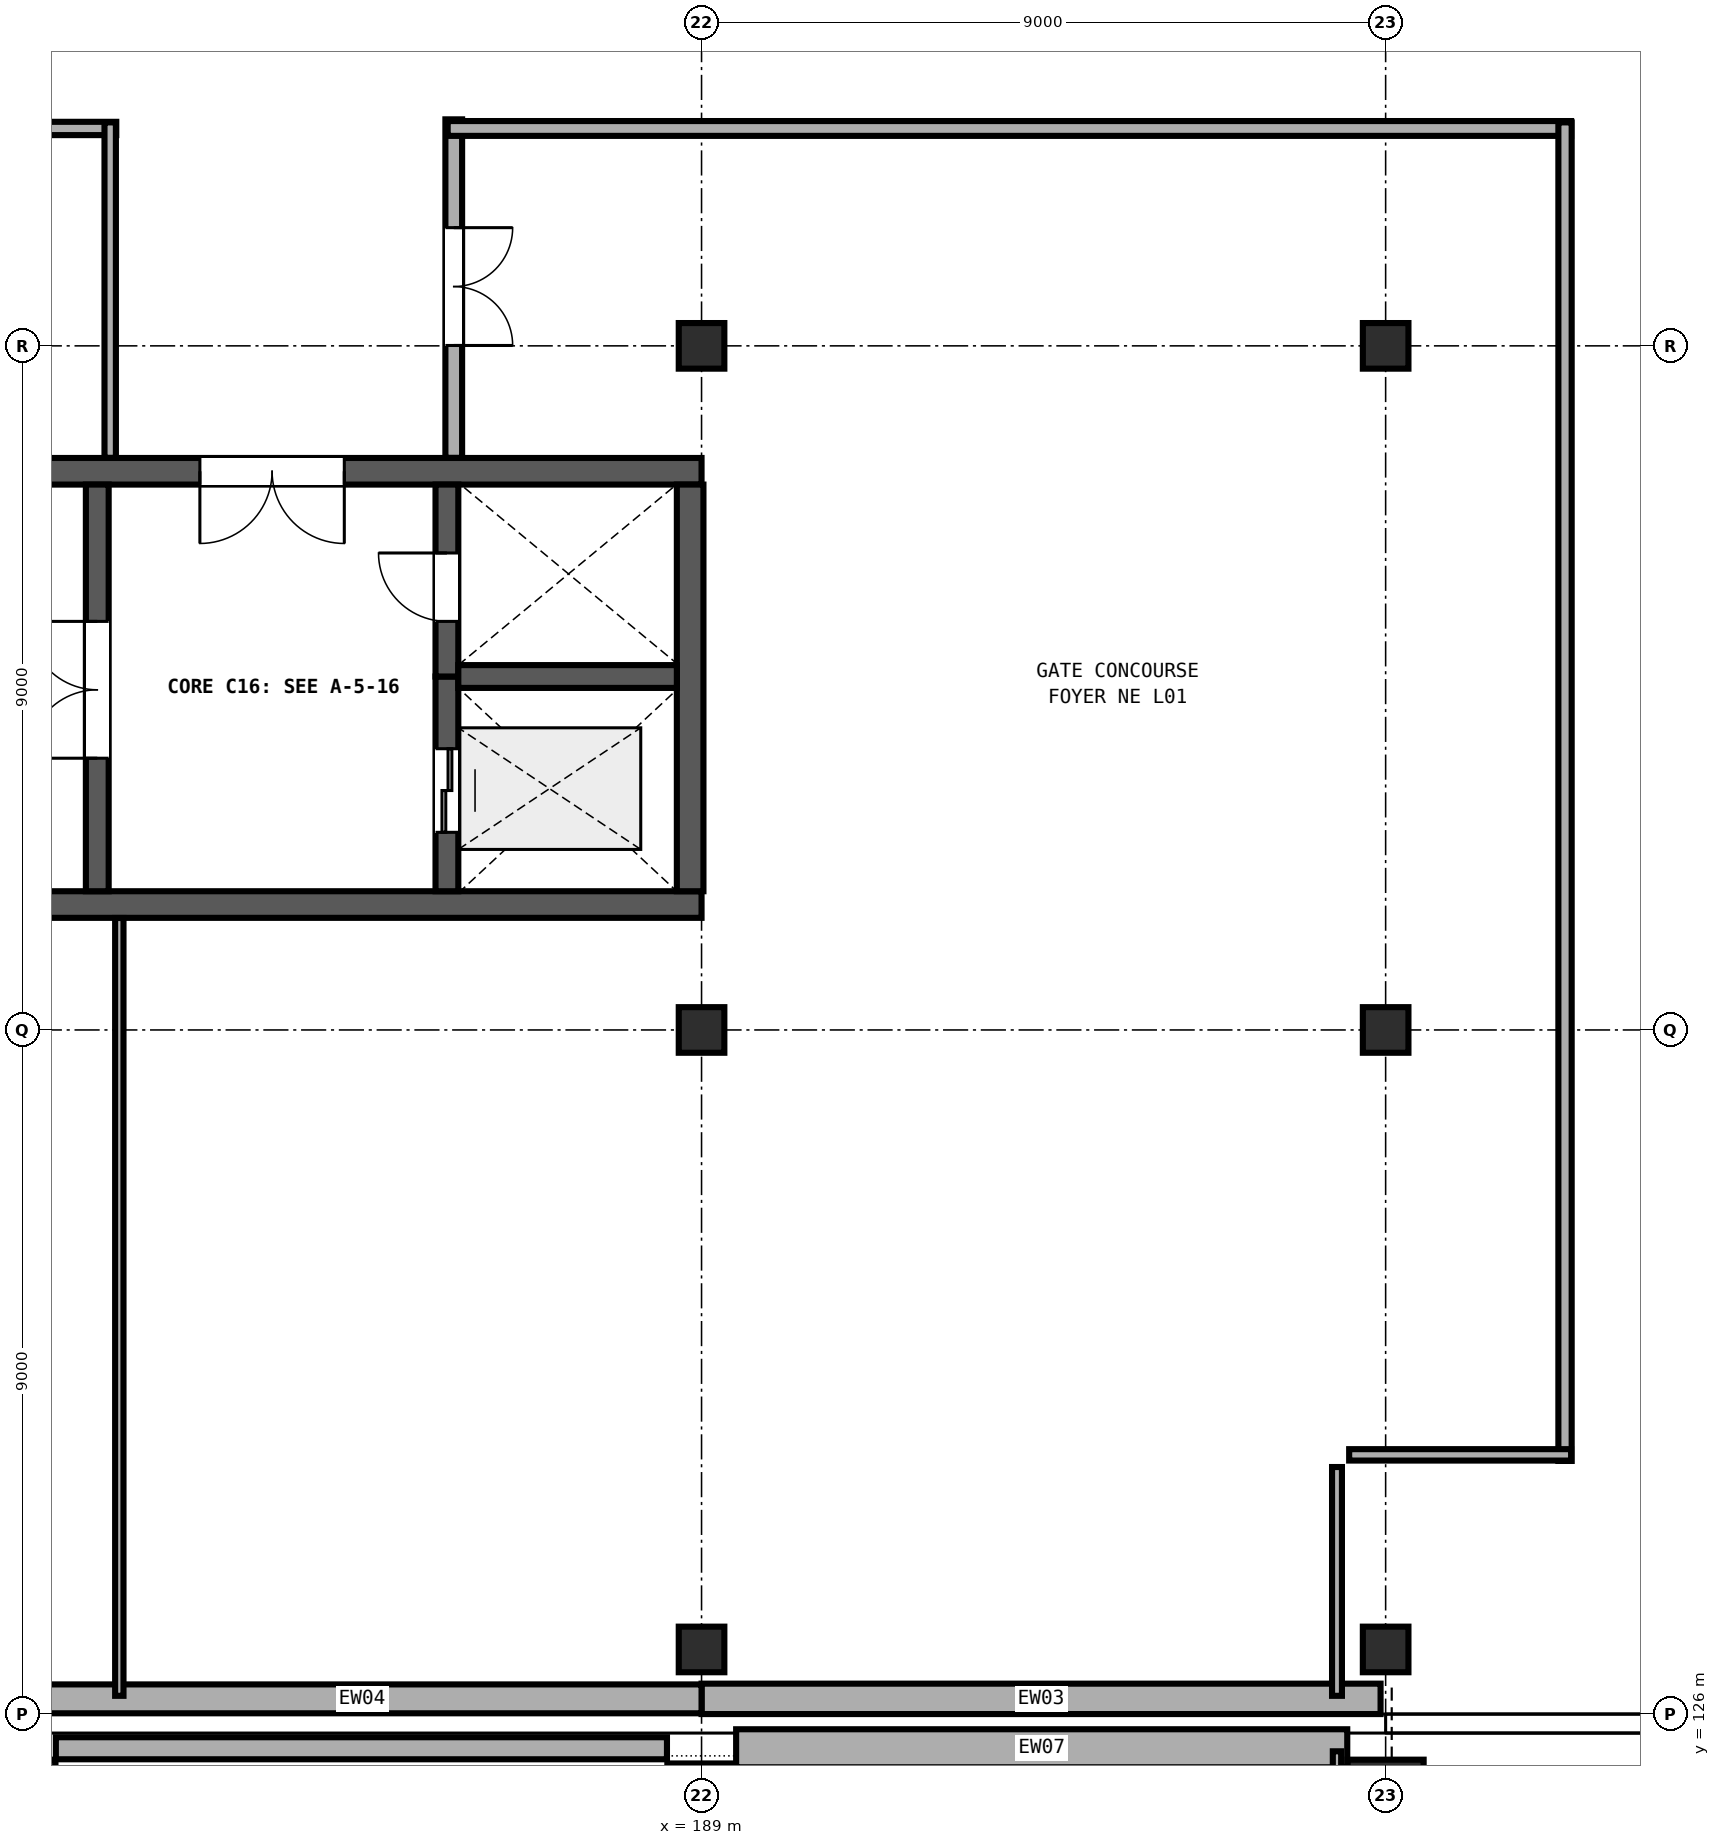
"""IFC4 building model, lengths in metres.
Left out: names, types, materials, properties, quantities, classifications, styles, units other than length and angle.
Written with IfcOpenShell. Run it as: python <this file> out.ifc"""

import sys

from ifc_helpers import new_model, si_unit, direction, frame, frame_2d, origin, origin_2d, place, context, subcontext, project, spatial, rectangle, extrude, element, fill, save


model = new_model("IFC4")
c1 = context("Model", 3, precision=1e-05, world=origin(), true_north=direction((0.0, 1.0)))
c2 = subcontext(c1, "Body", "Model", "MODEL_VIEW")
j1 = project(units=[si_unit("LENGTHUNIT", "METRE"), si_unit("PLANEANGLEUNIT", "RADIAN")], contexts=[c1])
p1 = place(None, origin())
s1 = spatial("IfcSite", under=j1, at=p1, CompositionType="ELEMENT")
p2 = place(p1, origin())
s2 = spatial("IfcBuilding", under=s1, at=p2, CompositionType="ELEMENT")
p3 = place(p2, frame((0.0, 0.0, 4.8)))
s3 = spatial("IfcBuildingStorey", under=s2, at=p3, CompositionType="ELEMENT", Elevation=4.8)
p4 = place(p3, frame((180.0, 124.9, 0.0), z_axis=(0.0, 0.0, 1.0), x_axis=(1.0, 0.0, 0.0)))
e1 = element("IfcColumn", 1, at=p4, inside=s3, PredefinedType="COLUMN", context=c2, shape_type="SweptSolid", body=[
    extrude(rectangle(XDim=1.0, YDim=1.0, at=origin_2d()), origin(), (0.0, 0.0, 1.0), 4.8),
])
p5 = place(p3, frame((189.0, 124.9, 0.0), z_axis=(0.0, 0.0, 1.0), x_axis=(1.0, 0.0, 0.0)))
e2 = element("IfcColumn", 2, at=p5, inside=s3, PredefinedType="COLUMN", context=c2, shape_type="SweptSolid", body=[
    extrude(rectangle(XDim=0.9, YDim=0.9, at=origin_2d()), origin(), (0.0, 0.0, 1.0), 4.8),
])
p6 = place(p3, frame((198.0, 124.9, 0.0), z_axis=(0.0, 0.0, 1.0), x_axis=(1.0, 0.0, 0.0)))
e3 = element("IfcColumn", 3, at=p6, inside=s3, PredefinedType="COLUMN", context=c2, shape_type="SweptSolid", body=[
    extrude(rectangle(XDim=1.0, YDim=1.0, at=origin_2d()), origin(), (0.0, 0.0, 1.0), 4.8),
])
for number, where, z_axis, x_axis in (
    (4, (189.0, 126.85, 0.0), (0.0, 0.0, 1.0), (1.0, 0.0, 0.0)),
    (5, (189.0, 135.0, 0.0), (0.0, 0.0, 1.0), (1.0, 0.0, 0.0)),
    (6, (189.0, 144.0, 0.0), (0.0, 0.0, 1.0), (1.0, 0.0, 0.0)),
    (7, (198.0, 126.85, 0.0), (0.0, 0.0, 1.0), (1.0, 0.0, 0.0)),
    (8, (198.0, 135.0, 0.0), (0.0, 0.0, 1.0), (1.0, 0.0, 0.0)),
    (9, (198.0, 144.0, 0.0), (0.0, 0.0, 1.0), (1.0, 0.0, 0.0)),
):
    element("IfcColumn", number, at=place(p3, frame(where, z_axis=z_axis, x_axis=x_axis)), inside=s3, PredefinedType="COLUMN", context=c2, shape_type="SweptSolid", body=[
        extrude(rectangle(XDim=0.6, YDim=0.6, at=origin_2d()), origin(), (0.0, 0.0, 1.0), 4.8),
    ])
p7 = place(p3, frame((171.0, 136.65, 0.0), z_axis=(0.0, 0.0, 1.0), x_axis=(1.0, 0.0, 0.0)))
e10 = element("IfcWall", 10, at=p7, inside=s3, PredefinedType="SHEAR", context=c2, shape_type="SweptSolid", body=[
    extrude(rectangle(XDim=18.0, YDim=0.35, at=frame_2d((9.0, 0.0))), origin(), (0.0, 0.0, 1.0), 4.565),
])
p8 = place(p3, frame((189.0, 142.35, 0.0), z_axis=(0.0, 0.0, 1.0), x_axis=(-1.0, 0.0, 0.0)))
e11 = element("IfcWall", 11, at=p8, inside=s3, PredefinedType="SHEAR", context=c2, shape_type="SweptSolid", body=[
    extrude(rectangle(XDim=18.0, YDim=0.35, at=frame_2d((9.0, 0.0))), origin(), (0.0, 0.0, 1.0), 4.565),
])
p9 = place(p8, frame((4.7, 0.0, 0.0)))
e12 = element("IfcOpeningElement", 12, at=p9, cuts=e11, PredefinedType="OPENING", context=c2, shape_type="SweptSolid", body=[
    extrude(rectangle(XDim=1.9, YDim=2.25, at=frame_2d((0.95, 1.125))), frame((0.0, 0.185, 0.0), z_axis=(0.0, -1.0, 0.0), x_axis=(1.0, 0.0, 0.0)), (0.0, 0.0, 1.0), 0.37),
])
p10 = place(p3, frame((188.85, 136.825, 0.0), z_axis=(0.0, 0.0, 1.0), x_axis=(0.0, 1.0, 0.0)))
e13 = element("IfcWall", 13, at=p10, inside=s3, PredefinedType="SHEAR", context=c2, shape_type="SweptSolid", body=[
    extrude(rectangle(XDim=5.35, YDim=0.35, at=frame_2d((2.675, 0.0))), origin(), (0.0, 0.0, 1.0), 4.565),
])
p11 = place(p3, frame((181.05, 136.825, 0.0), z_axis=(0.0, 0.0, 1.0), x_axis=(0.0, 1.0, 0.0)))
e14 = element("IfcWall", 14, at=p11, inside=s3, PredefinedType="SHEAR", context=c2, shape_type="SweptSolid", body=[
    extrude(rectangle(XDim=5.35, YDim=0.3, at=frame_2d((2.675, 0.0))), origin(), (0.0, 0.0, 1.0), 4.565),
])
p12 = place(p11, frame((1.75, 0.0, 0.0)))
e15 = element("IfcOpeningElement", 15, at=p12, cuts=e14, PredefinedType="OPENING", context=c2, shape_type="SweptSolid", body=[
    extrude(rectangle(XDim=1.8, YDim=2.25, at=frame_2d((0.9, 1.125))), frame((0.0, 0.16, 0.0), z_axis=(0.0, -1.0, 0.0), x_axis=(1.0, 0.0, 0.0)), (0.0, 0.0, 1.0), 0.32),
])
p13 = place(p3, frame((185.65, 136.825, 0.0), z_axis=(0.0, 0.0, 1.0), x_axis=(0.0, 1.0, 0.0)))
e16 = element("IfcWall", 16, at=p13, inside=s3, PredefinedType="SHEAR", context=c2, shape_type="SweptSolid", body=[
    extrude(rectangle(XDim=2.825, YDim=0.3, at=frame_2d((1.413, 0.0))), origin(), (0.0, 0.0, 1.0), 4.565),
])
p14 = place(p13, frame((0.775, 0.0, 0.0)))
e17 = element("IfcOpeningElement", 17, at=p14, cuts=e16, PredefinedType="OPENING", context=c2, shape_type="SweptSolid", body=[
    extrude(rectangle(XDim=1.1, YDim=2.1, at=frame_2d((0.55, 1.05))), frame((0.0, 0.16, 0.0), z_axis=(0.0, -1.0, 0.0), x_axis=(1.0, 0.0, 0.0)), (0.0, 0.0, 1.0), 0.32),
])
p15 = place(p3, frame((185.65, 139.65, 0.0), z_axis=(0.0, 0.0, 1.0), x_axis=(0.0, 1.0, 0.0)))
e18 = element("IfcWall", 18, at=p15, inside=s3, PredefinedType="SHEAR", context=c2, shape_type="SweptSolid", body=[
    extrude(rectangle(XDim=2.525, YDim=0.3, at=frame_2d((1.263, 0.0))), origin(), (0.0, 0.0, 1.0), 4.565),
])
p16 = place(p15, frame((0.725, 0.0, 0.0)))
e19 = element("IfcOpeningElement", 19, at=p16, cuts=e18, PredefinedType="OPENING", context=c2, shape_type="SweptSolid", body=[
    extrude(rectangle(XDim=0.9, YDim=2.1, at=frame_2d((0.45, 1.05))), frame((0.0, 0.16, 0.0), z_axis=(0.0, -1.0, 0.0), x_axis=(1.0, 0.0, 0.0)), (0.0, 0.0, 1.0), 0.32),
])
p17 = place(p3, frame((185.8, 139.65, 0.0), z_axis=(0.0, 0.0, 1.0), x_axis=(1.0, 0.0, 0.0)))
e20 = element("IfcWall", 20, at=p17, inside=s3, PredefinedType="SHEAR", context=c2, shape_type="SweptSolid", body=[
    extrude(rectangle(XDim=2.875, YDim=0.3, at=frame_2d((1.438, 0.0))), origin(), (0.0, 0.0, 1.0), 4.565),
])
p18 = place(p3, frame((180.505, 125.55, 0.0), z_axis=(0.0, 0.0, 1.0), x_axis=(1.0, 0.0, 0.0)))
e21 = element("IfcWall", 21, at=p18, inside=s3, PredefinedType="SOLIDWALL", context=c2, shape_type="SweptSolid", body=[
    extrude(rectangle(XDim=8.04, YDim=0.29, at=frame_2d((4.02, 0.0))), origin(), (0.0, 0.0, 1.0), 3.28),
])
p19 = place(p3, frame((189.455, 125.55, 0.0), z_axis=(0.0, 0.0, 1.0), x_axis=(1.0, 0.0, 0.0)))
e22 = element("IfcWall", 22, at=p19, inside=s3, PredefinedType="SOLIDWALL", context=c2, shape_type="SweptSolid", body=[
    extrude(rectangle(XDim=8.04, YDim=0.5, at=frame_2d((4.02, 0.0))), origin(), (0.0, 0.0, 1.0), 3.28),
])
p20 = place(p3, frame((197.933, 126.2, 0.0), z_axis=(0.0, 0.0, 1.0), x_axis=(-1.0, 0.0, 0.0)))
e23 = element("IfcWall", 23, at=p20, inside=s3, PredefinedType="SOLIDWALL", context=c2, shape_type="SweptSolid", body=[
    extrude(rectangle(XDim=8.933, YDim=0.4, at=frame_2d((4.467, 0.0))), origin(), (0.0, 0.0, 1.0), 3.28),
])
p21 = place(p3, frame((189.0, 126.2, 0.0), z_axis=(0.0, 0.0, 1.0), x_axis=(-1.0, 0.0, 0.0)))
e24 = element("IfcWall", 24, at=p21, inside=s3, PredefinedType="SOLIDWALL", context=c2, shape_type="SweptSolid", body=[
    extrude(rectangle(XDim=8.933, YDim=0.38, at=frame_2d((4.467, 0.0))), origin(), (0.0, 0.0, 1.0), 3.28),
])
p22 = place(p3, frame((197.36, 125.51, 0.0), z_axis=(0.0, 0.0, 1.0), x_axis=(0.0, -1.0, 0.0)))
e25 = element("IfcWall", 25, at=p22, inside=s3, PredefinedType="PARTITIONING", context=c2, shape_type="SweptSolid", body=[
    extrude(rectangle(XDim=3.01, YDim=0.11, at=frame_2d((1.505, 0.0))), origin(), (0.0, 0.0, 1.0), 3.28),
])
p23 = place(p3, frame((185.74, 146.98, 0.0), z_axis=(0.0, 0.0, 1.0), x_axis=(0.0, -1.0, 0.0)))
e26 = element("IfcWall", 26, at=p23, inside=s3, PredefinedType="PARTITIONING", context=c2, shape_type="SweptSolid", body=[
    extrude(rectangle(XDim=4.453, YDim=0.22, at=frame_2d((2.227, 0.0))), origin(), (0.0, 0.0, 1.0), 3.28),
])
p24 = place(p23, frame((1.425, 0.0, 0.0)))
e27 = element("IfcOpeningElement", 27, at=p24, cuts=e26, PredefinedType="OPENING", context=c2, shape_type="SweptSolid", body=[
    extrude(rectangle(XDim=1.55, YDim=2.2, at=frame_2d((0.775, 1.1))), frame((0.0, 0.12, 0.0), z_axis=(0.0, -1.0, 0.0), x_axis=(1.0, 0.0, 0.0)), (0.0, 0.0, 1.0), 0.24),
])
p25 = place(p3, frame((185.66, 146.86, 0.0), z_axis=(0.0, 0.0, 1.0), x_axis=(1.0, 0.0, 0.0)))
e28 = element("IfcWall", 28, at=p25, inside=s3, PredefinedType="PARTITIONING", context=c2, shape_type="SweptSolid", body=[
    extrude(rectangle(XDim=14.78, YDim=0.195, at=frame_2d((7.39, 0.0))), origin(), (0.0, 0.0, 1.0), 3.28),
])
p26 = place(p3, frame((200.36, 146.94, 0.0), z_axis=(0.0, 0.0, 1.0), x_axis=(0.0, -1.0, 0.0)))
e29 = element("IfcWall", 29, at=p26, inside=s3, PredefinedType="PARTITIONING", context=c2, shape_type="SweptSolid", body=[
    extrude(rectangle(XDim=17.61, YDim=0.175, at=frame_2d((8.805, 0.0))), origin(), (0.0, 0.0, 1.0), 3.28),
])
p27 = place(p3, frame((200.44, 129.41, 0.0), z_axis=(0.0, 0.0, 1.0), x_axis=(-1.0, 0.0, 0.0)))
e30 = element("IfcWall", 30, at=p27, inside=s3, PredefinedType="PARTITIONING", context=c2, shape_type="SweptSolid", body=[
    extrude(rectangle(XDim=2.92, YDim=0.15, at=frame_2d((1.46, 0.0))), origin(), (0.0, 0.0, 1.0), 3.28),
])
p28 = place(p3, frame((197.36, 129.25, 0.0), z_axis=(0.0, 0.0, 1.0), x_axis=(0.0, -1.0, 0.0)))
e31 = element("IfcWall", 31, at=p28, inside=s3, PredefinedType="PARTITIONING", context=c2, shape_type="SweptSolid", body=[
    extrude(rectangle(XDim=3.01, YDim=0.13, at=frame_2d((1.505, 0.0))), origin(), (0.0, 0.0, 1.0), 3.28),
])
p29 = place(p3, frame((181.34, 126.24, 0.0), z_axis=(0.0, 0.0, 1.0), x_axis=(0.0, 1.0, 0.0)))
e32 = element("IfcWall", 32, at=p29, inside=s3, PredefinedType="PARTITIONING", context=c2, shape_type="SweptSolid", body=[
    extrude(rectangle(XDim=10.233, YDim=0.11, at=frame_2d((5.116, 0.0))), origin(), (0.0, 0.0, 1.0), 3.28),
])
p30 = place(p3, frame((165.33, 146.86, 0.0), z_axis=(0.0, 0.0, 1.0), x_axis=(1.0, 0.0, 0.0)))
e33 = element("IfcWall", 33, at=p30, inside=s3, PredefinedType="PARTITIONING", context=c2, shape_type="SweptSolid", body=[
    extrude(rectangle(XDim=15.97, YDim=0.175, at=frame_2d((7.985, 0.0))), origin(), (0.0, 0.0, 1.0), 3.28),
])
p31 = place(p3, frame((181.22, 146.94, 0.0), z_axis=(0.0, 0.0, 1.0), x_axis=(0.0, -1.0, 0.0)))
e34 = element("IfcWall", 34, at=p31, inside=s3, PredefinedType="PARTITIONING", context=c2, shape_type="SweptSolid", body=[
    extrude(rectangle(XDim=4.413, YDim=0.15, at=frame_2d((2.207, 0.0))), origin(), (0.0, 0.0, 1.0), 3.28),
])
p32 = place(p12, origin())
e35 = element("IfcDoor", 35, at=p32, inside=s3, OperationType="DOUBLE_DOOR_SINGLE_SWING", PredefinedType="DOOR", context=c2, shape_type="SweptSolid", body=[
    extrude(rectangle(XDim=1.8, YDim=2.25, at=frame_2d((0.9, 1.125))), frame((0.0, 0.025, 0.0), z_axis=(0.0, -1.0, 0.0), x_axis=(1.0, 0.0, 0.0)), (0.0, 0.0, 1.0), 0.05),
])
fill(e15, e35)
p33 = place(p16, origin())
e36 = element("IfcDoor", 36, at=p33, inside=s3, OperationType="SINGLE_SWING_RIGHT", PredefinedType="DOOR", context=c2, shape_type="SweptSolid", body=[
    extrude(rectangle(XDim=0.9, YDim=2.1, at=frame_2d((0.45, 1.05))), frame((0.0, 0.025, 0.0), z_axis=(0.0, -1.0, 0.0), x_axis=(1.0, 0.0, 0.0)), (0.0, 0.0, 1.0), 0.05),
])
fill(e19, e36)
p34 = place(p14, origin())
e37 = element("IfcDoor", 37, at=p34, inside=s3, OperationType="DOUBLE_DOOR_SLIDING", PredefinedType="DOOR", context=c2, shape_type="SweptSolid", body=[
    extrude(rectangle(XDim=1.1, YDim=2.1, at=frame_2d((0.55, 1.05))), frame((0.0, 0.025, 0.0), z_axis=(0.0, -1.0, 0.0), x_axis=(1.0, 0.0, 0.0)), (0.0, 0.0, 1.0), 0.05),
])
fill(e17, e37)
p35 = place(p9, origin())
e38 = element("IfcDoor", 38, at=p35, inside=s3, OperationType="DOUBLE_DOOR_SINGLE_SWING", PredefinedType="DOOR", context=c2, shape_type="SweptSolid", body=[
    extrude(rectangle(XDim=1.9, YDim=2.25, at=frame_2d((0.95, 1.125))), frame((0.0, 0.025, 0.0), z_axis=(0.0, -1.0, 0.0), x_axis=(1.0, 0.0, 0.0)), (0.0, 0.0, 1.0), 0.05),
])
fill(e12, e38)
p36 = place(p24, origin())
e39 = element("IfcDoor", 39, at=p36, inside=s3, OperationType="DOUBLE_DOOR_SINGLE_SWING", PredefinedType="DOOR", context=c2, shape_type="SweptSolid", body=[
    extrude(rectangle(XDim=1.55, YDim=2.2, at=frame_2d((0.775, 1.1))), frame((0.0, 0.025, 0.0), z_axis=(0.0, -1.0, 0.0), x_axis=(1.0, 0.0, 0.0)), (0.0, 0.0, 1.0), 0.05),
])
fill(e27, e39)
save(model, sys.argv[1])
